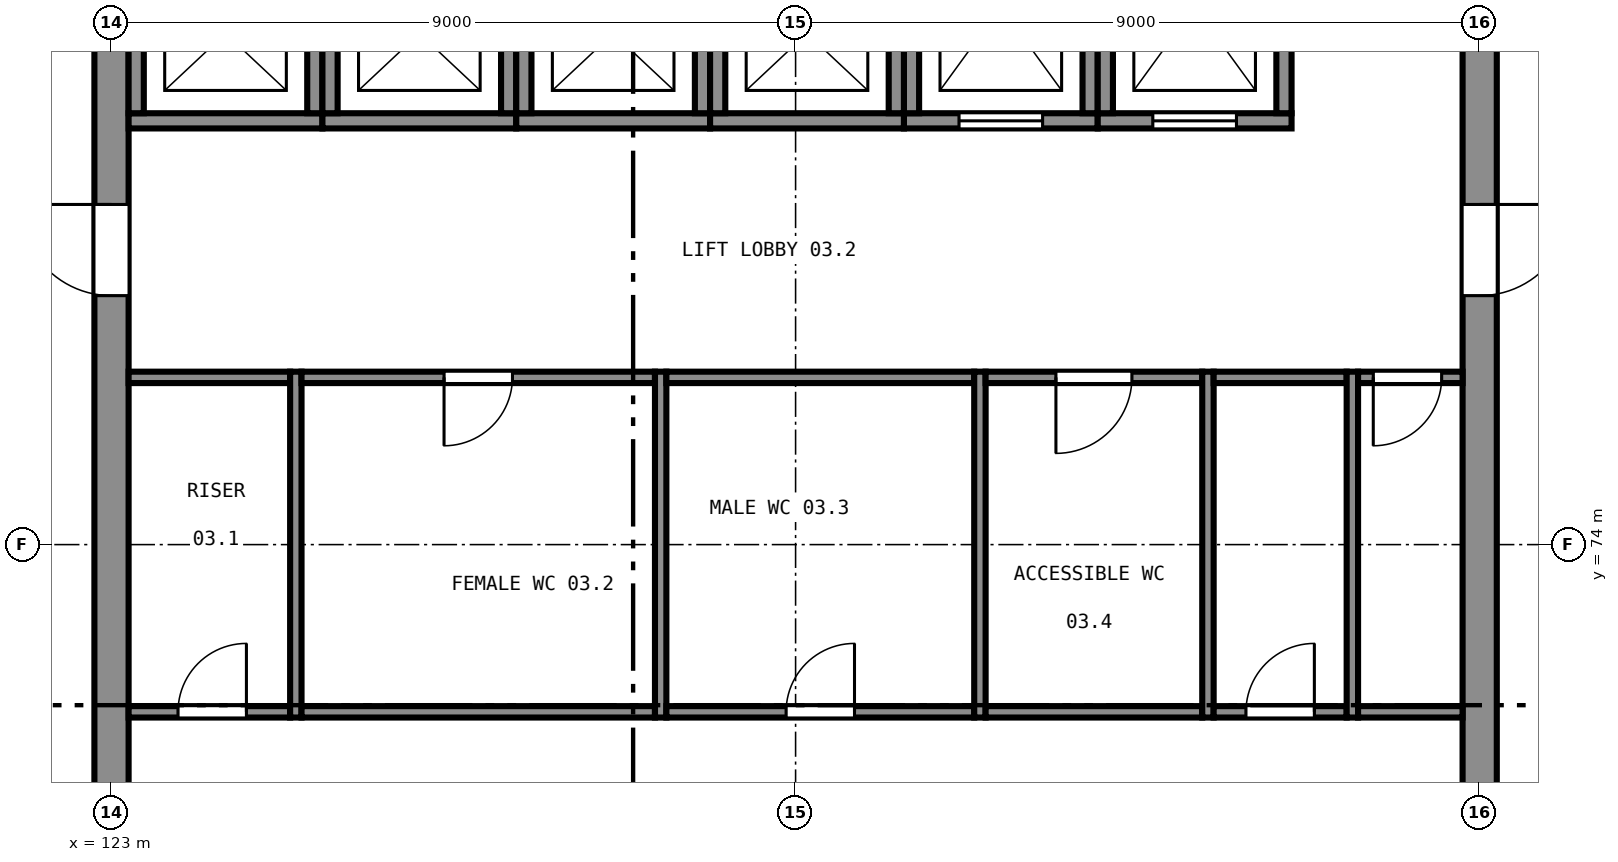
"""IFC4 building model, lengths in metres.
Left out: names, types, materials, properties, quantities, classifications, styles, units other than length and angle.
Written with IfcOpenShell. Run it as: python <this file> out.ifc"""

import sys

from ifc_helpers import new_model, si_unit, direction, frame, frame_2d, origin, place, context, subcontext, project, spatial, rectangle, extrude, element, fill, save


model = new_model("IFC4")
c1 = context("Model", 3, precision=1e-05, world=origin(), true_north=direction((0.0, 1.0)))
c2 = subcontext(c1, "Body", "Model", "MODEL_VIEW")
j1 = project(units=[si_unit("LENGTHUNIT", "METRE"), si_unit("PLANEANGLEUNIT", "RADIAN")], contexts=[c1])
p1 = place(None, origin())
s1 = spatial("IfcSite", under=j1, at=p1, CompositionType="ELEMENT")
p2 = place(p1, origin())
s2 = spatial("IfcBuilding", under=s1, at=p2, CompositionType="ELEMENT")
p3 = place(p2, frame((0.0, 0.0, 13.5)))
s3 = spatial("IfcBuildingStorey", under=s2, at=p3, CompositionType="ELEMENT", Elevation=13.5)
p4 = place(p3, frame((141.0, 65.225, 0.0), z_axis=(0.0, 0.0, 1.0), x_axis=(0.0, 1.0, 0.0)))
e1 = element("IfcWall", 1, at=p4, inside=s3, PredefinedType="SHEAR", context=c2, shape_type="SweptSolid", body=[
    extrude(rectangle(XDim=17.55, YDim=0.45, at=frame_2d((8.775, 0.0))), origin(), (0.0, 0.0, 1.0), 4.0),
])
p5 = place(p4, frame((4.3, 0.0, 0.0)))
e2 = element("IfcOpeningElement", 2, at=p5, cuts=e1, PredefinedType="OPENING", context=c2, shape_type="SweptSolid", body=[
    extrude(rectangle(XDim=1.2, YDim=2.1, at=frame_2d((0.6, 1.05))), frame((0.0, 0.235, 0.0), z_axis=(0.0, -1.0, 0.0), x_axis=(1.0, 0.0, 0.0)), (0.0, 0.0, 1.0), 0.47),
])
p6 = place(p4, frame((12.05, 0.0, 0.0)))
e3 = element("IfcOpeningElement", 3, at=p6, cuts=e1, PredefinedType="OPENING", context=c2, shape_type="SweptSolid", body=[
    extrude(rectangle(XDim=1.2, YDim=2.1, at=frame_2d((0.6, 1.05))), frame((0.0, 0.235, 0.0), z_axis=(0.0, -1.0, 0.0), x_axis=(1.0, 0.0, 0.0)), (0.0, 0.0, 1.0), 0.47),
])
p7 = place(p3, frame((123.0, 82.775, 0.0), z_axis=(0.0, 0.0, 1.0), x_axis=(0.0, -1.0, 0.0)))
e4 = element("IfcWall", 4, at=p7, inside=s3, PredefinedType="SHEAR", context=c2, shape_type="SweptSolid", body=[
    extrude(rectangle(XDim=17.55, YDim=0.45, at=frame_2d((8.775, 0.0))), origin(), (0.0, 0.0, 1.0), 4.0),
])
p8 = place(p7, frame((12.05, 0.0, 0.0)))
e5 = element("IfcOpeningElement", 5, at=p8, cuts=e4, PredefinedType="OPENING", context=c2, shape_type="SweptSolid", body=[
    extrude(rectangle(XDim=1.2, YDim=2.1, at=frame_2d((0.6, 1.05))), frame((0.0, 0.235, 0.0), z_axis=(0.0, -1.0, 0.0), x_axis=(1.0, 0.0, 0.0)), (0.0, 0.0, 1.0), 0.47),
])
p9 = place(p7, frame((4.3, 0.0, 0.0)))
e6 = element("IfcOpeningElement", 6, at=p9, cuts=e4, PredefinedType="OPENING", context=c2, shape_type="SweptSolid", body=[
    extrude(rectangle(XDim=1.2, YDim=2.1, at=frame_2d((0.6, 1.05))), frame((0.0, 0.235, 0.0), z_axis=(0.0, -1.0, 0.0), x_axis=(1.0, 0.0, 0.0)), (0.0, 0.0, 1.0), 0.47),
])
p10 = place(p3, frame((123.225, 79.575, 0.0), z_axis=(0.0, 0.0, 1.0), x_axis=(1.0, 0.0, 0.0)))
e7 = element("IfcWall", 7, at=p10, inside=s3, PredefinedType="SHEAR", context=c2, shape_type="SweptSolid", body=[
    extrude(rectangle(XDim=2.55, YDim=0.2, at=frame_2d((1.275, 0.0))), origin(), (0.0, 0.0, 1.0), 4.0),
])
for number, where, z_axis, x_axis in (
    (8, (125.675, 79.675, 0.0), (0.0, 0.0, 1.0), (0.0, 1.0, 0.0)),
    (9, (123.325, 81.775, 0.0), (0.0, 0.0, 1.0), (0.0, -1.0, 0.0)),
):
    element("IfcWall", number, at=place(p3, frame(where, z_axis=z_axis, x_axis=x_axis)), inside=s3, PredefinedType="SHEAR", context=c2, shape_type="SweptSolid", body=[
        extrude(rectangle(XDim=2.1, YDim=0.2, at=frame_2d((1.05, 0.0))), origin(), (0.0, 0.0, 1.0), 4.0),
    ])
p11 = place(p3, frame((125.775, 79.575, 0.0), z_axis=(0.0, 0.0, 1.0), x_axis=(1.0, 0.0, 0.0)))
e10 = element("IfcWall", 10, at=p11, inside=s3, PredefinedType="SHEAR", context=c2, shape_type="SweptSolid", body=[
    extrude(rectangle(XDim=2.55, YDim=0.2, at=frame_2d((1.275, 0.0))), origin(), (0.0, 0.0, 1.0), 4.0),
])
for number, where, z_axis, x_axis in (
    (11, (128.225, 79.675, 0.0), (0.0, 0.0, 1.0), (0.0, 1.0, 0.0)),
    (12, (125.875, 81.775, 0.0), (0.0, 0.0, 1.0), (0.0, -1.0, 0.0)),
):
    element("IfcWall", number, at=place(p3, frame(where, z_axis=z_axis, x_axis=x_axis)), inside=s3, PredefinedType="SHEAR", context=c2, shape_type="SweptSolid", body=[
        extrude(rectangle(XDim=2.1, YDim=0.2, at=frame_2d((1.05, 0.0))), origin(), (0.0, 0.0, 1.0), 4.0),
    ])
p12 = place(p3, frame((128.325, 79.575, 0.0), z_axis=(0.0, 0.0, 1.0), x_axis=(1.0, 0.0, 0.0)))
e13 = element("IfcWall", 13, at=p12, inside=s3, PredefinedType="SHEAR", context=c2, shape_type="SweptSolid", body=[
    extrude(rectangle(XDim=2.55, YDim=0.2, at=frame_2d((1.275, 0.0))), origin(), (0.0, 0.0, 1.0), 4.0),
])
for number, where, z_axis, x_axis in (
    (14, (130.775, 79.675, 0.0), (0.0, 0.0, 1.0), (0.0, 1.0, 0.0)),
    (15, (128.425, 81.775, 0.0), (0.0, 0.0, 1.0), (0.0, -1.0, 0.0)),
):
    element("IfcWall", number, at=place(p3, frame(where, z_axis=z_axis, x_axis=x_axis)), inside=s3, PredefinedType="SHEAR", context=c2, shape_type="SweptSolid", body=[
        extrude(rectangle(XDim=2.1, YDim=0.2, at=frame_2d((1.05, 0.0))), origin(), (0.0, 0.0, 1.0), 4.0),
    ])
p13 = place(p3, frame((130.875, 79.575, 0.0), z_axis=(0.0, 0.0, 1.0), x_axis=(1.0, 0.0, 0.0)))
e16 = element("IfcWall", 16, at=p13, inside=s3, PredefinedType="SHEAR", context=c2, shape_type="SweptSolid", body=[
    extrude(rectangle(XDim=2.55, YDim=0.2, at=frame_2d((1.275, 0.0))), origin(), (0.0, 0.0, 1.0), 4.0),
])
for number, where, z_axis, x_axis in (
    (17, (133.325, 79.675, 0.0), (0.0, 0.0, 1.0), (0.0, 1.0, 0.0)),
    (18, (130.975, 81.775, 0.0), (0.0, 0.0, 1.0), (0.0, -1.0, 0.0)),
):
    element("IfcWall", number, at=place(p3, frame(where, z_axis=z_axis, x_axis=x_axis)), inside=s3, PredefinedType="SHEAR", context=c2, shape_type="SweptSolid", body=[
        extrude(rectangle(XDim=2.1, YDim=0.2, at=frame_2d((1.05, 0.0))), origin(), (0.0, 0.0, 1.0), 4.0),
    ])
p14 = place(p3, frame((133.425, 79.575, 0.0), z_axis=(0.0, 0.0, 1.0), x_axis=(1.0, 0.0, 0.0)))
e19 = element("IfcWall", 19, at=p14, inside=s3, PredefinedType="SHEAR", context=c2, shape_type="SweptSolid", body=[
    extrude(rectangle(XDim=2.55, YDim=0.2, at=frame_2d((1.275, 0.0))), origin(), (0.0, 0.0, 1.0), 4.0),
])
p15 = place(p14, frame((0.725, 0.0, 0.0)))
e20 = element("IfcOpeningElement", 20, at=p15, cuts=e19, PredefinedType="OPENING", context=c2, shape_type="SweptSolid", body=[
    extrude(rectangle(XDim=1.1, YDim=2.1, at=frame_2d((0.55, 1.05))), frame((0.0, 0.11, 0.0), z_axis=(0.0, -1.0, 0.0), x_axis=(1.0, 0.0, 0.0)), (0.0, 0.0, 1.0), 0.22),
])
for number, where, z_axis, x_axis in (
    (21, (135.875, 79.675, 0.0), (0.0, 0.0, 1.0), (0.0, 1.0, 0.0)),
    (22, (133.525, 82.475, 0.0), (0.0, 0.0, 1.0), (0.0, -1.0, 0.0)),
):
    element("IfcWall", number, at=place(p3, frame(where, z_axis=z_axis, x_axis=x_axis)), inside=s3, PredefinedType="SHEAR", context=c2, shape_type="SweptSolid", body=[
        extrude(rectangle(XDim=2.8, YDim=0.2, at=frame_2d((1.4, 0.0))), origin(), (0.0, 0.0, 1.0), 4.0),
    ])
p16 = place(p3, frame((135.975, 79.575, 0.0), z_axis=(0.0, 0.0, 1.0), x_axis=(1.0, 0.0, 0.0)))
e23 = element("IfcWall", 23, at=p16, inside=s3, PredefinedType="SHEAR", context=c2, shape_type="SweptSolid", body=[
    extrude(rectangle(XDim=2.55, YDim=0.2, at=frame_2d((1.275, 0.0))), origin(), (0.0, 0.0, 1.0), 4.0),
])
p17 = place(p16, frame((0.725, 0.0, 0.0)))
e24 = element("IfcOpeningElement", 24, at=p17, cuts=e23, PredefinedType="OPENING", context=c2, shape_type="SweptSolid", body=[
    extrude(rectangle(XDim=1.1, YDim=2.1, at=frame_2d((0.55, 1.05))), frame((0.0, 0.11, 0.0), z_axis=(0.0, -1.0, 0.0), x_axis=(1.0, 0.0, 0.0)), (0.0, 0.0, 1.0), 0.22),
])
for number, where, z_axis, x_axis in (
    (25, (138.425, 79.675, 0.0), (0.0, 0.0, 1.0), (0.0, 1.0, 0.0)),
    (26, (136.075, 82.475, 0.0), (0.0, 0.0, 1.0), (0.0, -1.0, 0.0)),
):
    element("IfcWall", number, at=place(p3, frame(where, z_axis=z_axis, x_axis=x_axis)), inside=s3, PredefinedType="SHEAR", context=c2, shape_type="SweptSolid", body=[
        extrude(rectangle(XDim=2.8, YDim=0.2, at=frame_2d((1.4, 0.0))), origin(), (0.0, 0.0, 1.0), 4.0),
    ])
p18 = place(p3, frame((125.425, 71.725, 0.0), z_axis=(0.0, 0.0, 1.0), x_axis=(0.0, 1.0, 0.0)))
e27 = element("IfcWall", 27, at=p18, inside=s3, PredefinedType="PARTITIONING", context=c2, shape_type="SweptSolid", body=[
    extrude(rectangle(XDim=4.55, YDim=0.15, at=frame_2d((2.275, 0.0))), origin(), (0.0, 0.0, 1.0), 3.58),
])
p19 = place(p3, frame((123.225, 71.8, 0.0), z_axis=(0.0, 0.0, 1.0), x_axis=(1.0, 0.0, 0.0)))
e28 = element("IfcWall", 28, at=p19, inside=s3, PredefinedType="PARTITIONING", context=c2, shape_type="SweptSolid", body=[
    extrude(rectangle(XDim=2.125, YDim=0.15, at=frame_2d((1.062, 0.0))), origin(), (0.0, 0.0, 1.0), 3.58),
])
p20 = place(p19, frame((0.65, 0.0, 0.0)))
e29 = element("IfcOpeningElement", 29, at=p20, cuts=e28, PredefinedType="OPENING", context=c2, shape_type="SweptSolid", body=[
    extrude(rectangle(XDim=0.9, YDim=2.1, at=frame_2d((0.45, 1.05))), frame((0.0, 0.085, 0.0), z_axis=(0.0, -1.0, 0.0), x_axis=(1.0, 0.0, 0.0)), (0.0, 0.0, 1.0), 0.17),
])
p21 = place(p3, frame((123.225, 76.2, 0.0), z_axis=(0.0, 0.0, 1.0), x_axis=(1.0, 0.0, 0.0)))
e30 = element("IfcWall", 30, at=p21, inside=s3, PredefinedType="PARTITIONING", context=c2, shape_type="SweptSolid", body=[
    extrude(rectangle(XDim=2.125, YDim=0.15, at=frame_2d((1.062, 0.0))), origin(), (0.0, 0.0, 1.0), 3.58),
])
p22 = place(p3, frame((130.225, 71.725, 0.0), z_axis=(0.0, 0.0, 1.0), x_axis=(0.0, 1.0, 0.0)))
e31 = element("IfcWall", 31, at=p22, inside=s3, PredefinedType="PARTITIONING", context=c2, shape_type="SweptSolid", body=[
    extrude(rectangle(XDim=4.55, YDim=0.15, at=frame_2d((2.275, 0.0))), origin(), (0.0, 0.0, 1.0), 3.58),
])
p23 = place(p3, frame((125.5, 71.8, 0.0), z_axis=(0.0, 0.0, 1.0), x_axis=(1.0, 0.0, 0.0)))
e32 = element("IfcWall", 32, at=p23, inside=s3, PredefinedType="PARTITIONING", context=c2, shape_type="SweptSolid", body=[
    extrude(rectangle(XDim=4.65, YDim=0.15, at=frame_2d((2.325, 0.0))), origin(), (0.0, 0.0, 1.0), 3.58),
])
p24 = place(p3, frame((125.5, 76.2, 0.0), z_axis=(0.0, 0.0, 1.0), x_axis=(1.0, 0.0, 0.0)))
e33 = element("IfcWall", 33, at=p24, inside=s3, PredefinedType="PARTITIONING", context=c2, shape_type="SweptSolid", body=[
    extrude(rectangle(XDim=4.65, YDim=0.15, at=frame_2d((2.325, 0.0))), origin(), (0.0, 0.0, 1.0), 3.58),
])
p25 = place(p24, frame((1.875, 0.0, 0.0)))
e34 = element("IfcOpeningElement", 34, at=p25, cuts=e33, PredefinedType="OPENING", context=c2, shape_type="SweptSolid", body=[
    extrude(rectangle(XDim=0.9, YDim=2.1, at=frame_2d((0.45, 1.05))), frame((0.0, 0.085, 0.0), z_axis=(0.0, -1.0, 0.0), x_axis=(1.0, 0.0, 0.0)), (0.0, 0.0, 1.0), 0.17),
])
p26 = place(p3, frame((134.425, 71.725, 0.0), z_axis=(0.0, 0.0, 1.0), x_axis=(0.0, 1.0, 0.0)))
e35 = element("IfcWall", 35, at=p26, inside=s3, PredefinedType="PARTITIONING", context=c2, shape_type="SweptSolid", body=[
    extrude(rectangle(XDim=4.55, YDim=0.15, at=frame_2d((2.275, 0.0))), origin(), (0.0, 0.0, 1.0), 3.58),
])
p27 = place(p3, frame((130.3, 71.8, 0.0), z_axis=(0.0, 0.0, 1.0), x_axis=(1.0, 0.0, 0.0)))
e36 = element("IfcWall", 36, at=p27, inside=s3, PredefinedType="PARTITIONING", context=c2, shape_type="SweptSolid", body=[
    extrude(rectangle(XDim=4.05, YDim=0.15, at=frame_2d((2.025, 0.0))), origin(), (0.0, 0.0, 1.0), 3.58),
])
p28 = place(p27, frame((1.575, 0.0, 0.0)))
e37 = element("IfcOpeningElement", 37, at=p28, cuts=e36, PredefinedType="OPENING", context=c2, shape_type="SweptSolid", body=[
    extrude(rectangle(XDim=0.9, YDim=2.1, at=frame_2d((0.45, 1.05))), frame((0.0, 0.085, 0.0), z_axis=(0.0, -1.0, 0.0), x_axis=(1.0, 0.0, 0.0)), (0.0, 0.0, 1.0), 0.17),
])
p29 = place(p3, frame((130.3, 76.2, 0.0), z_axis=(0.0, 0.0, 1.0), x_axis=(1.0, 0.0, 0.0)))
e38 = element("IfcWall", 38, at=p29, inside=s3, PredefinedType="PARTITIONING", context=c2, shape_type="SweptSolid", body=[
    extrude(rectangle(XDim=4.05, YDim=0.15, at=frame_2d((2.025, 0.0))), origin(), (0.0, 0.0, 1.0), 3.58),
])
p30 = place(p3, frame((137.425, 71.725, 0.0), z_axis=(0.0, 0.0, 1.0), x_axis=(0.0, 1.0, 0.0)))
e39 = element("IfcWall", 39, at=p30, inside=s3, PredefinedType="PARTITIONING", context=c2, shape_type="SweptSolid", body=[
    extrude(rectangle(XDim=4.55, YDim=0.15, at=frame_2d((2.275, 0.0))), origin(), (0.0, 0.0, 1.0), 3.58),
])
p31 = place(p3, frame((134.5, 71.8, 0.0), z_axis=(0.0, 0.0, 1.0), x_axis=(1.0, 0.0, 0.0)))
e40 = element("IfcWall", 40, at=p31, inside=s3, PredefinedType="PARTITIONING", context=c2, shape_type="SweptSolid", body=[
    extrude(rectangle(XDim=2.85, YDim=0.15, at=frame_2d((1.425, 0.0))), origin(), (0.0, 0.0, 1.0), 3.58),
])
p32 = place(p3, frame((134.5, 76.2, 0.0), z_axis=(0.0, 0.0, 1.0), x_axis=(1.0, 0.0, 0.0)))
e41 = element("IfcWall", 41, at=p32, inside=s3, PredefinedType="PARTITIONING", context=c2, shape_type="SweptSolid", body=[
    extrude(rectangle(XDim=2.85, YDim=0.15, at=frame_2d((1.425, 0.0))), origin(), (0.0, 0.0, 1.0), 3.58),
])
p33 = place(p32, frame((0.925, 0.0, 0.0)))
e42 = element("IfcOpeningElement", 42, at=p33, cuts=e41, PredefinedType="OPENING", context=c2, shape_type="SweptSolid", body=[
    extrude(rectangle(XDim=1.0, YDim=2.1, at=frame_2d((0.5, 1.05))), frame((0.0, 0.085, 0.0), z_axis=(0.0, -1.0, 0.0), x_axis=(1.0, 0.0, 0.0)), (0.0, 0.0, 1.0), 0.17),
])
p34 = place(p3, frame((139.325, 71.725, 0.0), z_axis=(0.0, 0.0, 1.0), x_axis=(0.0, 1.0, 0.0)))
e43 = element("IfcWall", 43, at=p34, inside=s3, PredefinedType="PARTITIONING", context=c2, shape_type="SweptSolid", body=[
    extrude(rectangle(XDim=4.55, YDim=0.15, at=frame_2d((2.275, 0.0))), origin(), (0.0, 0.0, 1.0), 3.58),
])
p35 = place(p3, frame((137.5, 71.8, 0.0), z_axis=(0.0, 0.0, 1.0), x_axis=(1.0, 0.0, 0.0)))
e44 = element("IfcWall", 44, at=p35, inside=s3, PredefinedType="PARTITIONING", context=c2, shape_type="SweptSolid", body=[
    extrude(rectangle(XDim=1.75, YDim=0.15, at=frame_2d((0.875, 0.0))), origin(), (0.0, 0.0, 1.0), 3.58),
])
p36 = place(p35, frame((0.425, 0.0, 0.0)))
e45 = element("IfcOpeningElement", 45, at=p36, cuts=e44, PredefinedType="OPENING", context=c2, shape_type="SweptSolid", body=[
    extrude(rectangle(XDim=0.9, YDim=2.1, at=frame_2d((0.45, 1.05))), frame((0.0, 0.085, 0.0), z_axis=(0.0, -1.0, 0.0), x_axis=(1.0, 0.0, 0.0)), (0.0, 0.0, 1.0), 0.17),
])
p37 = place(p3, frame((137.5, 76.2, 0.0), z_axis=(0.0, 0.0, 1.0), x_axis=(1.0, 0.0, 0.0)))
e46 = element("IfcWall", 46, at=p37, inside=s3, PredefinedType="PARTITIONING", context=c2, shape_type="SweptSolid", body=[
    extrude(rectangle(XDim=1.75, YDim=0.15, at=frame_2d((0.875, 0.0))), origin(), (0.0, 0.0, 1.0), 3.58),
])
p38 = place(p3, frame((139.4, 71.8, 0.0), z_axis=(0.0, 0.0, 1.0), x_axis=(1.0, 0.0, 0.0)))
e47 = element("IfcWall", 47, at=p38, inside=s3, PredefinedType="PARTITIONING", context=c2, shape_type="SweptSolid", body=[
    extrude(rectangle(XDim=1.375, YDim=0.15, at=frame_2d((0.688, 0.0))), origin(), (0.0, 0.0, 1.0), 3.58),
])
p39 = place(p3, frame((139.4, 76.2, 0.0), z_axis=(0.0, 0.0, 1.0), x_axis=(1.0, 0.0, 0.0)))
e48 = element("IfcWall", 48, at=p39, inside=s3, PredefinedType="PARTITIONING", context=c2, shape_type="SweptSolid", body=[
    extrude(rectangle(XDim=1.375, YDim=0.15, at=frame_2d((0.688, 0.0))), origin(), (0.0, 0.0, 1.0), 3.58),
])
p40 = place(p39, frame((0.2, 0.0, 0.0)))
e49 = element("IfcOpeningElement", 49, at=p40, cuts=e48, PredefinedType="OPENING", context=c2, shape_type="SweptSolid", body=[
    extrude(rectangle(XDim=0.9, YDim=2.1, at=frame_2d((0.45, 1.05))), frame((0.0, 0.085, 0.0), z_axis=(0.0, -1.0, 0.0), x_axis=(1.0, 0.0, 0.0)), (0.0, 0.0, 1.0), 0.17),
])
p41 = place(p15, origin())
e50 = element("IfcDoor", 50, at=p41, inside=s3, OperationType="SLIDING_TO_LEFT", PredefinedType="DOOR", context=c2, shape_type="SweptSolid", body=[
    extrude(rectangle(XDim=1.1, YDim=2.1, at=frame_2d((0.55, 1.05))), frame((0.0, 0.025, 0.0), z_axis=(0.0, -1.0, 0.0), x_axis=(1.0, 0.0, 0.0)), (0.0, 0.0, 1.0), 0.05),
])
fill(e20, e50)
p42 = place(p17, origin())
e51 = element("IfcDoor", 51, at=p42, inside=s3, OperationType="SLIDING_TO_LEFT", PredefinedType="DOOR", context=c2, shape_type="SweptSolid", body=[
    extrude(rectangle(XDim=1.1, YDim=2.1, at=frame_2d((0.55, 1.05))), frame((0.0, 0.025, 0.0), z_axis=(0.0, -1.0, 0.0), x_axis=(1.0, 0.0, 0.0)), (0.0, 0.0, 1.0), 0.05),
])
fill(e24, e51)
p43 = place(p9, frame((1.2, 0.0, 0.0), z_axis=(0.0, 0.0, 1.0), x_axis=(-1.0, 0.0, 0.0)))
e52 = element("IfcDoor", 52, at=p43, inside=s3, OperationType="SINGLE_SWING_LEFT", PredefinedType="DOOR", context=c2, shape_type="SweptSolid", body=[
    extrude(rectangle(XDim=1.2, YDim=2.1, at=frame_2d((0.6, 1.05))), frame((0.0, 0.025, 0.0), z_axis=(0.0, -1.0, 0.0), x_axis=(1.0, 0.0, 0.0)), (0.0, 0.0, 1.0), 0.05),
])
fill(e6, e52)
p44 = place(p6, frame((1.2, 0.0, 0.0), z_axis=(0.0, 0.0, 1.0), x_axis=(-1.0, 0.0, 0.0)))
e53 = element("IfcDoor", 53, at=p44, inside=s3, OperationType="SINGLE_SWING_RIGHT", PredefinedType="DOOR", context=c2, shape_type="SweptSolid", body=[
    extrude(rectangle(XDim=1.2, YDim=2.1, at=frame_2d((0.6, 1.05))), frame((0.0, 0.025, 0.0), z_axis=(0.0, -1.0, 0.0), x_axis=(1.0, 0.0, 0.0)), (0.0, 0.0, 1.0), 0.05),
])
fill(e3, e53)
p45 = place(p20, origin())
e54 = element("IfcDoor", 54, at=p45, inside=s3, OperationType="SINGLE_SWING_LEFT", PredefinedType="DOOR", context=c2, shape_type="SweptSolid", body=[
    extrude(rectangle(XDim=0.9, YDim=2.1, at=frame_2d((0.45, 1.05))), frame((0.0, 0.025, 0.0), z_axis=(0.0, -1.0, 0.0), x_axis=(1.0, 0.0, 0.0)), (0.0, 0.0, 1.0), 0.05),
])
fill(e29, e54)
p46 = place(p25, frame((0.9, 0.0, 0.0), z_axis=(0.0, 0.0, 1.0), x_axis=(-1.0, 0.0, 0.0)))
e55 = element("IfcDoor", 55, at=p46, inside=s3, OperationType="SINGLE_SWING_LEFT", PredefinedType="DOOR", context=c2, shape_type="SweptSolid", body=[
    extrude(rectangle(XDim=0.9, YDim=2.1, at=frame_2d((0.45, 1.05))), frame((0.0, 0.025, 0.0), z_axis=(0.0, -1.0, 0.0), x_axis=(1.0, 0.0, 0.0)), (0.0, 0.0, 1.0), 0.05),
])
fill(e34, e55)
p47 = place(p28, origin())
e56 = element("IfcDoor", 56, at=p47, inside=s3, OperationType="SINGLE_SWING_LEFT", PredefinedType="DOOR", context=c2, shape_type="SweptSolid", body=[
    extrude(rectangle(XDim=0.9, YDim=2.1, at=frame_2d((0.45, 1.05))), frame((0.0, 0.025, 0.0), z_axis=(0.0, -1.0, 0.0), x_axis=(1.0, 0.0, 0.0)), (0.0, 0.0, 1.0), 0.05),
])
fill(e37, e56)
p48 = place(p33, frame((1.0, 0.0, 0.0), z_axis=(0.0, 0.0, 1.0), x_axis=(-1.0, 0.0, 0.0)))
e57 = element("IfcDoor", 57, at=p48, inside=s3, OperationType="SINGLE_SWING_LEFT", PredefinedType="DOOR", context=c2, shape_type="SweptSolid", body=[
    extrude(rectangle(XDim=1.0, YDim=2.1, at=frame_2d((0.5, 1.05))), frame((0.0, 0.025, 0.0), z_axis=(0.0, -1.0, 0.0), x_axis=(1.0, 0.0, 0.0)), (0.0, 0.0, 1.0), 0.05),
])
fill(e42, e57)
p49 = place(p36, origin())
e58 = element("IfcDoor", 58, at=p49, inside=s3, OperationType="SINGLE_SWING_LEFT", PredefinedType="DOOR", context=c2, shape_type="SweptSolid", body=[
    extrude(rectangle(XDim=0.9, YDim=2.1, at=frame_2d((0.45, 1.05))), frame((0.0, 0.025, 0.0), z_axis=(0.0, -1.0, 0.0), x_axis=(1.0, 0.0, 0.0)), (0.0, 0.0, 1.0), 0.05),
])
fill(e45, e58)
p50 = place(p40, frame((0.9, 0.0, 0.0), z_axis=(0.0, 0.0, 1.0), x_axis=(-1.0, 0.0, 0.0)))
e59 = element("IfcDoor", 59, at=p50, inside=s3, OperationType="SINGLE_SWING_LEFT", PredefinedType="DOOR", context=c2, shape_type="SweptSolid", body=[
    extrude(rectangle(XDim=0.9, YDim=2.1, at=frame_2d((0.45, 1.05))), frame((0.0, 0.025, 0.0), z_axis=(0.0, -1.0, 0.0), x_axis=(1.0, 0.0, 0.0)), (0.0, 0.0, 1.0), 0.05),
])
fill(e49, e59)
save(model, sys.argv[1])
